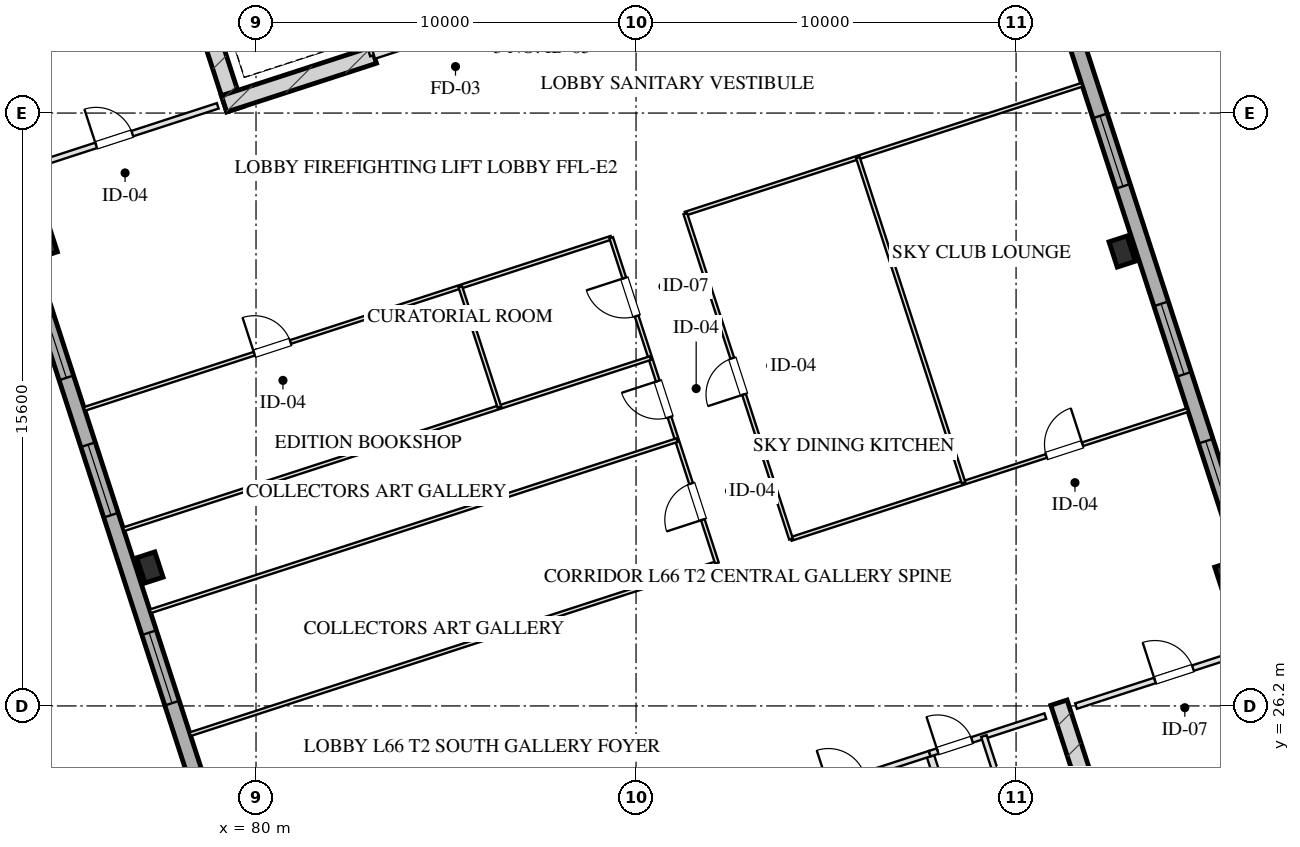
"""IFC4 building model, lengths in metres.
Left out: names, types, materials, properties, quantities, classifications, styles, units other than length and angle.
Written with IfcOpenShell. Run it as: python <this file> out.ifc"""

import sys

from ifc_helpers import new_model, si_unit, direction, frame, frame_2d, origin, origin_2d, place, context, subcontext, project, spatial, rectangle, hollow_rectangle, extrude, element, fill, save


model = new_model("IFC4")
c1 = context("Model", 3, precision=1e-05, world=origin(), true_north=direction((0.0, 1.0)))
c2 = subcontext(c1, "Body", "Model", "MODEL_VIEW")
j1 = project(units=[si_unit("LENGTHUNIT", "METRE"), si_unit("PLANEANGLEUNIT", "RADIAN")], contexts=[c1])
p1 = place(None, origin())
s1 = spatial("IfcSite", under=j1, at=p1, CompositionType="ELEMENT")
p2 = place(p1, origin())
s2 = spatial("IfcBuilding", under=s1, at=p2, CompositionType="ELEMENT")
p3 = place(p2, frame((0.0, 0.0, 244.0)))
s3 = spatial("IfcBuildingStorey", under=s2, at=p3, CompositionType="ELEMENT", Elevation=244.0)
for number, where, z_axis, x_axis in (
    (1, (101.128, 26.286, 0.0), (0.0, 0.0, 1.0), (0.309, -0.951, 0.0)),
    (2, (79.442, 41.899, 0.0), (0.0, 0.0, 1.0), (-0.309, 0.951, 0.0)),
):
    element("IfcWall", number, at=place(p3, frame(where, z_axis=z_axis, x_axis=x_axis)), inside=s3, PredefinedType="SHEAR", context=c2, shape_type="SweptSolid", body=[
        extrude(rectangle(XDim=9.33, YDim=0.45, at=frame_2d((4.665, 0.0))), origin(), (0.0, 0.0, 1.0), 3.2),
    ])
p4 = place(p3, frame((79.159, 42.043, 0.0), z_axis=(0.0, 0.0, 1.0), x_axis=(0.951047485828, 0.309044785913, 0.0)))
e3 = element("IfcWall", 3, at=p4, inside=s3, PredefinedType="SHEAR", context=c2, shape_type="SweptSolid", body=[
    extrude(rectangle(XDim=4.145, YDim=0.45, at=frame_2d((2.073, 0.0))), origin(), (0.0, 0.0, 1.0), 3.2),
])
for number, where, z_axis, x_axis in (
    (4, (77.208, 29.844, 0.0), (0.0, 0.0, 1.0), (0.951, 0.309, 0.0)),
    (5, (74.427, 38.403, 0.0), (0.0, 0.0, 1.0), (0.951, 0.309, 0.0)),
    (6, (105.573, 29.597, 0.0), (0.0, 0.0, 1.0), (0.951, 0.309, 0.0)),
    (7, (102.792, 38.156, 0.0), (0.0, 0.0, 1.0), (0.951, 0.309, 0.0)),
):
    element("IfcColumn", number, at=place(p3, frame(where, z_axis=z_axis, x_axis=x_axis)), inside=s3, PredefinedType="COLUMN", context=c2, shape_type="SweptSolid", body=[
        extrude(hollow_rectangle(XDim=0.5, YDim=0.7, WallThickness=0.025, at=origin_2d()), origin(), (0.0, 0.0, 1.0), 3.201),
    ])
p5 = place(p3, frame((82.618, 11.414, 0.0), z_axis=(0.0, 0.0, 1.0), x_axis=(-0.309016491071, 0.951056679828, 0.0)))
e8 = element("IfcWall", 8, at=p5, inside=s3, PredefinedType="SOLIDWALL", context=c2, shape_type="SweptSolid", body=[
    extrude(rectangle(XDim=38.4, YDim=0.4, at=frame_2d((19.2, 0.0))), origin(), (0.0, 0.0, 1.0), 2.36),
])
p6 = place(p5, frame((11.825, 0.0, 0.75)))
e9 = element("IfcOpeningElement", 9, at=p6, cuts=e8, PredefinedType="OPENING", context=c2, shape_type="SweptSolid", body=[
    extrude(rectangle(XDim=1.95, YDim=1.21, at=frame_2d((0.975, 0.605))), frame((0.0, 0.21, 0.0), z_axis=(0.0, -1.0, 0.0), x_axis=(1.0, 0.0, 0.0)), (0.0, 0.0, 1.0), 0.42),
])
p7 = place(p5, frame((15.625, 0.0, 0.75)))
e10 = element("IfcOpeningElement", 10, at=p7, cuts=e8, PredefinedType="OPENING", context=c2, shape_type="SweptSolid", body=[
    extrude(rectangle(XDim=1.95, YDim=1.21, at=frame_2d((0.975, 0.605))), frame((0.0, 0.21, 0.0), z_axis=(0.0, -1.0, 0.0), x_axis=(1.0, 0.0, 0.0)), (0.0, 0.0, 1.0), 0.42),
])
p8 = place(p5, frame((20.825, 0.0, 0.75)))
e11 = element("IfcOpeningElement", 11, at=p8, cuts=e8, PredefinedType="OPENING", context=c2, shape_type="SweptSolid", body=[
    extrude(rectangle(XDim=1.95, YDim=1.21, at=frame_2d((0.975, 0.605))), frame((0.0, 0.21, 0.0), z_axis=(0.0, -1.0, 0.0), x_axis=(1.0, 0.0, 0.0)), (0.0, 0.0, 1.0), 0.42),
])
p9 = place(p5, frame((24.625, 0.0, 0.75)))
e12 = element("IfcOpeningElement", 12, at=p9, cuts=e8, PredefinedType="OPENING", context=c2, shape_type="SweptSolid", body=[
    extrude(rectangle(XDim=1.95, YDim=1.21, at=frame_2d((0.975, 0.605))), frame((0.0, 0.21, 0.0), z_axis=(0.0, -1.0, 0.0), x_axis=(1.0, 0.0, 0.0)), (0.0, 0.0, 1.0), 0.42),
])
p10 = place(p3, frame((97.382, 56.586, 0.0), z_axis=(0.0, 0.0, 1.0), x_axis=(0.309016491071, -0.951056679828, 0.0)))
e13 = element("IfcWall", 13, at=p10, inside=s3, PredefinedType="SOLIDWALL", context=c2, shape_type="SweptSolid", body=[
    extrude(rectangle(XDim=38.4, YDim=0.4, at=frame_2d((19.2, 0.0))), origin(), (0.0, 0.0, 1.0), 2.36),
])
p11 = place(p10, frame((24.625, 0.0, 0.75)))
e14 = element("IfcOpeningElement", 14, at=p11, cuts=e13, PredefinedType="OPENING", context=c2, shape_type="SweptSolid", body=[
    extrude(rectangle(XDim=1.95, YDim=1.21, at=frame_2d((0.975, 0.605))), frame((0.0, 0.21, 0.0), z_axis=(0.0, -1.0, 0.0), x_axis=(1.0, 0.0, 0.0)), (0.0, 0.0, 1.0), 0.42),
])
p12 = place(p10, frame((20.825, 0.0, 0.75)))
e15 = element("IfcOpeningElement", 15, at=p12, cuts=e13, PredefinedType="OPENING", context=c2, shape_type="SweptSolid", body=[
    extrude(rectangle(XDim=1.95, YDim=1.21, at=frame_2d((0.975, 0.605))), frame((0.0, 0.21, 0.0), z_axis=(0.0, -1.0, 0.0), x_axis=(1.0, 0.0, 0.0)), (0.0, 0.0, 1.0), 0.42),
])
p13 = place(p10, frame((15.625, 0.0, 0.75)))
e16 = element("IfcOpeningElement", 16, at=p13, cuts=e13, PredefinedType="OPENING", context=c2, shape_type="SweptSolid", body=[
    extrude(rectangle(XDim=1.95, YDim=1.21, at=frame_2d((0.975, 0.605))), frame((0.0, 0.21, 0.0), z_axis=(0.0, -1.0, 0.0), x_axis=(1.0, 0.0, 0.0)), (0.0, 0.0, 1.0), 0.42),
])
p14 = place(p10, frame((11.825, 0.0, 0.75)))
e17 = element("IfcOpeningElement", 17, at=p14, cuts=e13, PredefinedType="OPENING", context=c2, shape_type="SweptSolid", body=[
    extrude(rectangle(XDim=1.95, YDim=1.21, at=frame_2d((0.975, 0.605))), frame((0.0, 0.21, 0.0), z_axis=(0.0, -1.0, 0.0), x_axis=(1.0, 0.0, 0.0)), (0.0, 0.0, 1.0), 0.42),
])
p15 = place(p3, frame((97.727, 24.944, 0.0), z_axis=(0.0, 0.0, 1.0), x_axis=(0.309016001439, -0.951056838919, 0.0)))
e18 = element("IfcWall", 18, at=p15, inside=s3, PredefinedType="PARTITIONING", context=c2, shape_type="SweptSolid", body=[
    extrude(rectangle(XDim=8.43, YDim=0.2, at=frame_2d((4.215, 0.0))), origin(), (0.0, 0.0, 1.0), 2.925),
])
p16 = place(p3, frame((93.542, 23.585, 0.0), z_axis=(0.0, 0.0, 1.0), x_axis=(0.951063829732, 0.308994485023, 0.0)))
e19 = element("IfcWall", 19, at=p16, inside=s3, PredefinedType="PARTITIONING", context=c2, shape_type="SweptSolid", body=[
    extrude(rectangle(XDim=4.4, YDim=0.15, at=frame_2d((2.2, 0.0))), origin(), (0.0, 0.0, 1.0), 2.925),
])
p17 = place(p16, frame((1.6, 0.0, 0.0)))
e20 = element("IfcOpeningElement", 20, at=p17, cuts=e19, PredefinedType="OPENING", context=c2, shape_type="SweptSolid", body=[
    extrude(rectangle(XDim=1.0, YDim=2.05, at=frame_2d((0.5, 1.025))), frame((0.0, 0.085, 0.0), z_axis=(0.0, -1.0, 0.0), x_axis=(1.0, 0.0, 0.0)), (0.0, 0.0, 1.0), 0.17),
])
p18 = place(p3, frame((97.727, 24.944, 0.0), z_axis=(0.0, 0.0, 1.0), x_axis=(0.951036872128, 0.309077446369, 0.0)))
e21 = element("IfcWall", 21, at=p18, inside=s3, PredefinedType="PARTITIONING", context=c2, shape_type="SweptSolid", body=[
    extrude(rectangle(XDim=3.2, YDim=0.15, at=frame_2d((1.6, 0.0))), origin(), (0.0, 0.0, 1.0), 2.925),
])
p19 = place(p18, frame((0.22, 0.0, 0.0)))
e22 = element("IfcOpeningElement", 22, at=p19, cuts=e21, PredefinedType="OPENING", context=c2, shape_type="SweptSolid", body=[
    extrude(rectangle(XDim=0.95, YDim=2.05, at=frame_2d((0.475, 1.025))), frame((0.0, 0.085, 0.0), z_axis=(0.0, -1.0, 0.0), x_axis=(1.0, 0.0, 0.0)), (0.0, 0.0, 1.0), 0.17),
])
p20 = place(p3, frame((99.153, 25.408, 0.0), z_axis=(0.0, 0.0, 1.0), x_axis=(0.309016001439, -0.951056838919, 0.0)))
e23 = element("IfcWall", 23, at=p20, inside=s3, PredefinedType="PARTITIONING", context=c2, shape_type="SweptSolid", body=[
    extrude(rectangle(XDim=8.43, YDim=0.15, at=frame_2d((4.215, 0.0))), origin(), (0.0, 0.0, 1.0), 2.925),
])
p21 = place(p20, frame((2.55, 0.0, 0.0)))
e24 = element("IfcOpeningElement", 24, at=p21, cuts=e23, PredefinedType="OPENING", context=c2, shape_type="SweptSolid", body=[
    extrude(rectangle(XDim=0.95, YDim=2.05, at=frame_2d((0.475, 1.025))), frame((0.0, 0.085, 0.0), z_axis=(0.0, -1.0, 0.0), x_axis=(1.0, 0.0, 0.0)), (0.0, 0.0, 1.0), 0.17),
])
p22 = place(p20, frame((5.8, 0.0, 0.0)))
e25 = element("IfcOpeningElement", 25, at=p22, cuts=e23, PredefinedType="OPENING", context=c2, shape_type="SweptSolid", body=[
    extrude(rectangle(XDim=0.9, YDim=2.05, at=frame_2d((0.45, 1.025))), frame((0.0, 0.085, 0.0), z_axis=(0.0, -1.0, 0.0), x_axis=(1.0, 0.0, 0.0)), (0.0, 0.0, 1.0), 0.17),
])
p23 = place(p3, frame((83.101, 43.324, 0.0), z_axis=(0.0, 0.0, 1.0), x_axis=(-0.309048298632, 0.951046344356, 0.0)))
e26 = element("IfcWall", 26, at=p23, inside=s3, PredefinedType="PARTITIONING", context=c2, shape_type="SweptSolid", body=[
    extrude(rectangle(XDim=1.9, YDim=0.2, at=frame_2d((0.95, 0.0))), origin(), (0.0, 0.0, 1.0), 2.925),
])
p24 = place(p23, frame((0.52, 0.0, 0.0)))
e27 = element("IfcOpeningElement", 27, at=p24, cuts=e26, PredefinedType="OPENING", context=c2, shape_type="SweptSolid", body=[
    extrude(rectangle(XDim=1.1, YDim=2.05, at=frame_2d((0.55, 1.025))), frame((0.0, 0.11, 0.0), z_axis=(0.0, -1.0, 0.0), x_axis=(1.0, 0.0, 0.0)), (0.0, 0.0, 1.0), 0.22),
])
p25 = place(p3, frame((83.101, 43.324, 0.0), z_axis=(0.0, 0.0, 1.0), x_axis=(0.951052804469, 0.309028417967, 0.0)))
e28 = element("IfcWall", 28, at=p25, inside=s3, PredefinedType="PARTITIONING", context=c2, shape_type="SweptSolid", body=[
    extrude(rectangle(XDim=3.83, YDim=0.2, at=frame_2d((1.915, 0.0))), origin(), (0.0, 0.0, 1.0), 2.925),
])
p26 = place(p25, frame((1.35, 0.0, 0.0)))
e29 = element("IfcOpeningElement", 29, at=p26, cuts=e28, PredefinedType="OPENING", context=c2, shape_type="SweptSolid", body=[
    extrude(rectangle(XDim=1.2, YDim=2.05, at=frame_2d((0.6, 1.025))), frame((0.0, 0.11, 0.0), z_axis=(0.0, -1.0, 0.0), x_axis=(1.0, 0.0, 0.0)), (0.0, 0.0, 1.0), 0.22),
])
p27 = place(p3, frame((101.578, 26.196, 0.0), z_axis=(0.0, 0.0, 1.0), x_axis=(0.951064427824, 0.308992644131, 0.0)))
e30 = element("IfcWall", 30, at=p27, inside=s3, PredefinedType="PARTITIONING", context=c2, shape_type="SweptSolid", body=[
    extrude(rectangle(XDim=5.2, YDim=0.15, at=frame_2d((2.6, 0.0))), origin(), (0.0, 0.0, 1.0), 2.925),
])
p28 = place(p27, frame((2.184, 0.0, 0.0)))
e31 = element("IfcOpeningElement", 31, at=p28, cuts=e30, PredefinedType="OPENING", context=c2, shape_type="SweptSolid", body=[
    extrude(rectangle(XDim=1.05, YDim=2.05, at=frame_2d((0.525, 1.025))), frame((0.0, 0.085, 0.0), z_axis=(0.0, -1.0, 0.0), x_axis=(1.0, 0.0, 0.0)), (0.0, 0.0, 1.0), 0.17),
])
p29 = place(p3, frame((73.476, 40.197, 0.0), z_axis=(0.0, 0.0, 1.0), x_axis=(0.951059431056, 0.309008023519, 0.0)))
e32 = element("IfcWall", 32, at=p29, inside=s3, PredefinedType="PARTITIONING", context=c2, shape_type="SweptSolid", body=[
    extrude(rectangle(XDim=5.8, YDim=0.15, at=frame_2d((2.9, 0.0))), origin(), (0.0, 0.0, 1.0), 2.925),
])
p30 = place(p29, frame((2.436, 0.0, 0.0)))
e33 = element("IfcOpeningElement", 33, at=p30, cuts=e32, PredefinedType="OPENING", context=c2, shape_type="SweptSolid", body=[
    extrude(rectangle(XDim=1.0, YDim=2.05, at=frame_2d((0.5, 1.025))), frame((0.0, 0.085, 0.0), z_axis=(0.0, -1.0, 0.0), x_axis=(1.0, 0.0, 0.0)), (0.0, 0.0, 1.0), 0.17),
])
p31 = place(p3, frame((78.266, 25.456, 0.0), z_axis=(0.0, 0.0, 1.0), x_axis=(0.951056346912, 0.309017515681, 0.0)))
e34 = element("IfcWall", 34, at=p31, inside=s3, PredefinedType="MOVABLE", context=c2, shape_type="SweptSolid", body=[
    extrude(rectangle(XDim=14.575, YDim=0.1, at=frame_2d((7.288, 0.0))), origin(), (0.0, 0.0, 1.0), 2.925),
])
p32 = place(p3, frame((94.077, 30.593, 0.0), z_axis=(0.0, 0.0, 1.0), x_axis=(0.951058423821, 0.309011123554, 0.0)))
e35 = element("IfcWall", 35, at=p32, inside=s3, PredefinedType="MOVABLE", context=c2, shape_type="SweptSolid", body=[
    extrude(rectangle(XDim=10.975, YDim=0.1, at=frame_2d((5.487, 0.0))), origin(), (0.0, 0.0, 1.0), 2.925),
])
p33 = place(p32, frame((7.065, 0.0, 0.0)))
e36 = element("IfcOpeningElement", 36, at=p33, cuts=e35, PredefinedType="OPENING", context=c2, shape_type="SweptSolid", body=[
    extrude(rectangle(XDim=1.0, YDim=2.05, at=frame_2d((0.5, 1.025))), frame((0.0, 0.06, 0.0), z_axis=(0.0, -1.0, 0.0), x_axis=(1.0, 0.0, 0.0)), (0.0, 0.0, 1.0), 0.12),
])
p34 = place(p3, frame((75.485, 34.015, 0.0), z_axis=(0.0, 0.0, 1.0), x_axis=(0.951056346912, 0.309017515681, 0.0)))
e37 = element("IfcWall", 37, at=p34, inside=s3, PredefinedType="MOVABLE", context=c2, shape_type="SweptSolid", body=[
    extrude(rectangle(XDim=14.575, YDim=0.1, at=frame_2d((7.288, 0.0))), origin(), (0.0, 0.0, 1.0), 2.925),
])
p35 = place(p34, frame((4.7, 0.0, 0.0)))
e38 = element("IfcOpeningElement", 38, at=p35, cuts=e37, PredefinedType="OPENING", context=c2, shape_type="SweptSolid", body=[
    extrude(rectangle(XDim=1.0, YDim=2.05, at=frame_2d((0.5, 1.025))), frame((0.0, 0.06, 0.0), z_axis=(0.0, -1.0, 0.0), x_axis=(1.0, 0.0, 0.0)), (0.0, 0.0, 1.0), 0.12),
])
p36 = place(p3, frame((91.296, 39.153, 0.0), z_axis=(0.0, 0.0, 1.0), x_axis=(0.951058423821, 0.309011123554, 0.0)))
e39 = element("IfcWall", 39, at=p36, inside=s3, PredefinedType="MOVABLE", context=c2, shape_type="SweptSolid", body=[
    extrude(rectangle(XDim=10.975, YDim=0.1, at=frame_2d((5.487, 0.0))), origin(), (0.0, 0.0, 1.0), 2.925),
])
p37 = place(p3, frame((92.128, 29.96, 0.0), z_axis=(0.0, 0.0, 1.0), x_axis=(-0.309024734286, 0.951054001411, 0.0)))
e40 = element("IfcWall", 40, at=p37, inside=s3, PredefinedType="MOVABLE", context=c2, shape_type="SweptSolid", body=[
    extrude(rectangle(XDim=9.0, YDim=0.1, at=frame_2d((4.5, 0.0))), origin(), (0.0, 0.0, 1.0), 2.925),
])
p38 = place(p37, frame((1.2, 0.0, 0.0)))
e41 = element("IfcOpeningElement", 41, at=p38, cuts=e40, PredefinedType="OPENING", context=c2, shape_type="SweptSolid", body=[
    extrude(rectangle(XDim=1.0, YDim=2.05, at=frame_2d((0.5, 1.025))), frame((0.0, 0.06, 0.0), z_axis=(0.0, -1.0, 0.0), x_axis=(1.0, 0.0, 0.0)), (0.0, 0.0, 1.0), 0.12),
])
p39 = place(p37, frame((4.035, 0.0, 0.0)))
e42 = element("IfcOpeningElement", 42, at=p39, cuts=e40, PredefinedType="OPENING", context=c2, shape_type="SweptSolid", body=[
    extrude(rectangle(XDim=1.0, YDim=2.05, at=frame_2d((0.5, 1.025))), frame((0.0, 0.06, 0.0), z_axis=(0.0, -1.0, 0.0), x_axis=(1.0, 0.0, 0.0)), (0.0, 0.0, 1.0), 0.12),
])
p40 = place(p37, frame((6.835, 0.0, 0.0)))
e43 = element("IfcOpeningElement", 43, at=p40, cuts=e40, PredefinedType="OPENING", context=c2, shape_type="SweptSolid", body=[
    extrude(rectangle(XDim=1.05, YDim=2.05, at=frame_2d((0.525, 1.025))), frame((0.0, 0.06, 0.0), z_axis=(0.0, -1.0, 0.0), x_axis=(1.0, 0.0, 0.0)), (0.0, 0.0, 1.0), 0.12),
])
p41 = place(p3, frame((94.077, 30.593, 0.0), z_axis=(0.0, 0.0, 1.0), x_axis=(-0.309024734286, 0.951054001411, 0.0)))
e44 = element("IfcWall", 44, at=p41, inside=s3, PredefinedType="MOVABLE", context=c2, shape_type="SweptSolid", body=[
    extrude(rectangle(XDim=9.0, YDim=0.1, at=frame_2d((4.5, 0.0))), origin(), (0.0, 0.0, 1.0), 2.925),
])
p42 = place(p41, frame((4.0, 0.0, 0.0)))
e45 = element("IfcOpeningElement", 45, at=p42, cuts=e44, PredefinedType="OPENING", context=c2, shape_type="SweptSolid", body=[
    extrude(rectangle(XDim=1.0, YDim=2.05, at=frame_2d((0.5, 1.025))), frame((0.0, 0.06, 0.0), z_axis=(0.0, -1.0, 0.0), x_axis=(1.0, 0.0, 0.0)), (0.0, 0.0, 1.0), 0.12),
])
for number, where, z_axis, x_axis in (
    (46, (77.215, 28.689, 0.0), (0.0, 0.0, 1.0), (0.951, 0.309, 0.0)),
    (47, (76.514, 30.848, 0.0), (0.0, 0.0, 1.0), (0.951, 0.309, 0.0)),
):
    element("IfcWall", number, at=place(p3, frame(where, z_axis=z_axis, x_axis=x_axis)), inside=s3, PredefinedType="MOVABLE", context=c2, shape_type="SweptSolid", body=[
        extrude(rectangle(XDim=14.575, YDim=0.1, at=frame_2d((7.288, 0.0))), origin(), (0.0, 0.0, 1.0), 2.925),
    ])
p43 = place(p3, frame((86.405, 34.062, 0.0), z_axis=(0.0, 0.0, 1.0), x_axis=(-0.309026391202, 0.95105346303, 0.0)))
e48 = element("IfcWall", 48, at=p43, inside=s3, PredefinedType="MOVABLE", context=c2, shape_type="SweptSolid", body=[
    extrude(rectangle(XDim=3.33, YDim=0.1, at=frame_2d((1.665, 0.0))), origin(), (0.0, 0.0, 1.0), 2.925),
])
p44 = place(p3, frame((98.619, 32.069, 0.0), z_axis=(0.0, 0.0, 1.0), x_axis=(-0.309032706929, 0.951051410833, 0.0)))
e49 = element("IfcWall", 49, at=p44, inside=s3, PredefinedType="MOVABLE", context=c2, shape_type="SweptSolid", body=[
    extrude(rectangle(XDim=9.0, YDim=0.1, at=frame_2d((4.5, 0.0))), origin(), (0.0, 0.0, 1.0), 2.925),
])
p45 = place(p7, origin())
e50 = element("IfcWindow", 50, at=p45, inside=s3, PartitioningType="TRIPLE_PANEL_VERTICAL", PredefinedType="WINDOW", context=c2, shape_type="SweptSolid", body=[
    extrude(rectangle(XDim=1.95, YDim=1.21, at=frame_2d((0.975, 0.605))), frame((0.0, 0.03, 0.0), z_axis=(0.0, -1.0, 0.0), x_axis=(1.0, 0.0, 0.0)), (0.0, 0.0, 1.0), 0.06),
])
fill(e10, e50)
p46 = place(p8, origin())
e51 = element("IfcWindow", 51, at=p46, inside=s3, PartitioningType="TRIPLE_PANEL_VERTICAL", PredefinedType="WINDOW", context=c2, shape_type="SweptSolid", body=[
    extrude(rectangle(XDim=1.95, YDim=1.21, at=frame_2d((0.975, 0.605))), frame((0.0, 0.03, 0.0), z_axis=(0.0, -1.0, 0.0), x_axis=(1.0, 0.0, 0.0)), (0.0, 0.0, 1.0), 0.06),
])
fill(e11, e51)
p47 = place(p9, origin())
e52 = element("IfcWindow", 52, at=p47, inside=s3, PartitioningType="TRIPLE_PANEL_VERTICAL", PredefinedType="WINDOW", context=c2, shape_type="SweptSolid", body=[
    extrude(rectangle(XDim=1.95, YDim=1.21, at=frame_2d((0.975, 0.605))), frame((0.0, 0.03, 0.0), z_axis=(0.0, -1.0, 0.0), x_axis=(1.0, 0.0, 0.0)), (0.0, 0.0, 1.0), 0.06),
])
fill(e12, e52)
p48 = place(p11, origin())
e53 = element("IfcWindow", 53, at=p48, inside=s3, PartitioningType="TRIPLE_PANEL_VERTICAL", PredefinedType="WINDOW", context=c2, shape_type="SweptSolid", body=[
    extrude(rectangle(XDim=1.95, YDim=1.21, at=frame_2d((0.975, 0.605))), frame((0.0, 0.03, 0.0), z_axis=(0.0, -1.0, 0.0), x_axis=(1.0, 0.0, 0.0)), (0.0, 0.0, 1.0), 0.06),
])
fill(e14, e53)
p49 = place(p12, origin())
e54 = element("IfcWindow", 54, at=p49, inside=s3, PartitioningType="TRIPLE_PANEL_VERTICAL", PredefinedType="WINDOW", context=c2, shape_type="SweptSolid", body=[
    extrude(rectangle(XDim=1.95, YDim=1.21, at=frame_2d((0.975, 0.605))), frame((0.0, 0.03, 0.0), z_axis=(0.0, -1.0, 0.0), x_axis=(1.0, 0.0, 0.0)), (0.0, 0.0, 1.0), 0.06),
])
fill(e15, e54)
p50 = place(p13, origin())
e55 = element("IfcWindow", 55, at=p50, inside=s3, PartitioningType="TRIPLE_PANEL_VERTICAL", PredefinedType="WINDOW", context=c2, shape_type="SweptSolid", body=[
    extrude(rectangle(XDim=1.95, YDim=1.21, at=frame_2d((0.975, 0.605))), frame((0.0, 0.03, 0.0), z_axis=(0.0, -1.0, 0.0), x_axis=(1.0, 0.0, 0.0)), (0.0, 0.0, 1.0), 0.06),
])
fill(e16, e55)
p51 = place(p19, origin())
e56 = element("IfcDoor", 56, at=p51, inside=s3, OperationType="SINGLE_SWING_LEFT", PredefinedType="DOOR", context=c2, shape_type="SweptSolid", body=[
    extrude(rectangle(XDim=0.95, YDim=2.05, at=frame_2d((0.475, 1.025))), frame((0.0, 0.025, 0.0), z_axis=(0.0, -1.0, 0.0), x_axis=(1.0, 0.0, 0.0)), (0.0, 0.0, 1.0), 0.05),
])
fill(e22, e56)
p52 = place(p28, origin())
e57 = element("IfcDoor", 57, at=p52, inside=s3, OperationType="SINGLE_SWING_LEFT", PredefinedType="DOOR", context=c2, shape_type="SweptSolid", body=[
    extrude(rectangle(XDim=1.05, YDim=2.05, at=frame_2d((0.525, 1.025))), frame((0.0, 0.025, 0.0), z_axis=(0.0, -1.0, 0.0), x_axis=(1.0, 0.0, 0.0)), (0.0, 0.0, 1.0), 0.05),
])
fill(e31, e57)
p53 = place(p30, origin())
e58 = element("IfcDoor", 58, at=p53, inside=s3, OperationType="SINGLE_SWING_LEFT", PredefinedType="DOOR", context=c2, shape_type="SweptSolid", body=[
    extrude(rectangle(XDim=1.0, YDim=2.05, at=frame_2d((0.5, 1.025))), frame((0.0, 0.025, 0.0), z_axis=(0.0, -1.0, 0.0), x_axis=(1.0, 0.0, 0.0)), (0.0, 0.0, 1.0), 0.05),
])
fill(e33, e58)
p54 = place(p33, origin())
e59 = element("IfcDoor", 59, at=p54, inside=s3, OperationType="SINGLE_SWING_RIGHT", PredefinedType="DOOR", context=c2, shape_type="SweptSolid", body=[
    extrude(rectangle(XDim=1.0, YDim=2.05, at=frame_2d((0.5, 1.025))), frame((0.0, 0.025, 0.0), z_axis=(0.0, -1.0, 0.0), x_axis=(1.0, 0.0, 0.0)), (0.0, 0.0, 1.0), 0.05),
])
fill(e36, e59)
p55 = place(p35, origin())
e60 = element("IfcDoor", 60, at=p55, inside=s3, OperationType="SINGLE_SWING_LEFT", PredefinedType="DOOR", context=c2, shape_type="SweptSolid", body=[
    extrude(rectangle(XDim=1.0, YDim=2.05, at=frame_2d((0.5, 1.025))), frame((0.0, 0.025, 0.0), z_axis=(0.0, -1.0, 0.0), x_axis=(1.0, 0.0, 0.0)), (0.0, 0.0, 1.0), 0.05),
])
fill(e38, e60)
p56 = place(p38, origin())
e61 = element("IfcDoor", 61, at=p56, inside=s3, OperationType="SINGLE_SWING_LEFT", PredefinedType="DOOR", context=c2, shape_type="SweptSolid", body=[
    extrude(rectangle(XDim=1.0, YDim=2.05, at=frame_2d((0.5, 1.025))), frame((0.0, 0.025, 0.0), z_axis=(0.0, -1.0, 0.0), x_axis=(1.0, 0.0, 0.0)), (0.0, 0.0, 1.0), 0.05),
])
fill(e41, e61)
p57 = place(p39, origin())
e62 = element("IfcDoor", 62, at=p57, inside=s3, OperationType="SINGLE_SWING_RIGHT", PredefinedType="DOOR", context=c2, shape_type="SweptSolid", body=[
    extrude(rectangle(XDim=1.0, YDim=2.05, at=frame_2d((0.5, 1.025))), frame((0.0, 0.025, 0.0), z_axis=(0.0, -1.0, 0.0), x_axis=(1.0, 0.0, 0.0)), (0.0, 0.0, 1.0), 0.05),
])
fill(e42, e62)
p58 = place(p40, origin())
e63 = element("IfcDoor", 63, at=p58, inside=s3, OperationType="SINGLE_SWING_RIGHT", PredefinedType="DOOR", context=c2, shape_type="SweptSolid", body=[
    extrude(rectangle(XDim=1.05, YDim=2.05, at=frame_2d((0.525, 1.025))), frame((0.0, 0.025, 0.0), z_axis=(0.0, -1.0, 0.0), x_axis=(1.0, 0.0, 0.0)), (0.0, 0.0, 1.0), 0.05),
])
fill(e43, e63)
p59 = place(p42, origin())
e64 = element("IfcDoor", 64, at=p59, inside=s3, OperationType="SINGLE_SWING_LEFT", PredefinedType="DOOR", context=c2, shape_type="SweptSolid", body=[
    extrude(rectangle(XDim=1.0, YDim=2.05, at=frame_2d((0.5, 1.025))), frame((0.0, 0.025, 0.0), z_axis=(0.0, -1.0, 0.0), x_axis=(1.0, 0.0, 0.0)), (0.0, 0.0, 1.0), 0.05),
])
fill(e45, e64)
save(model, sys.argv[1])
